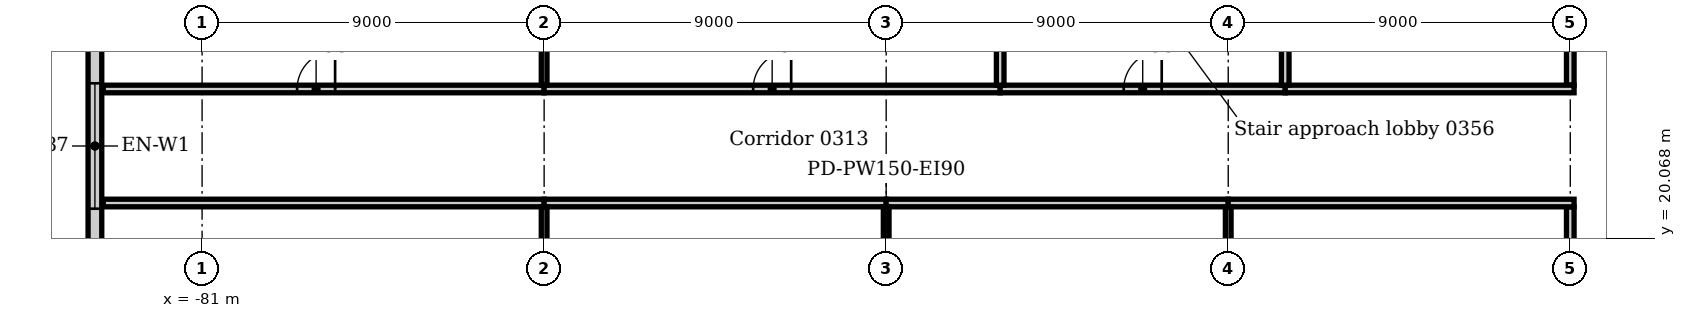
"""IFC4 building model, lengths in metres.
Left out: names, types, materials, properties, quantities, classifications, styles, units other than length and angle.
Written with IfcOpenShell. Run it as: python <this file> out.ifc"""

import sys

from ifc_helpers import new_model, si_unit, direction, frame, frame_2d, origin, place, context, subcontext, project, spatial, rectangle, extrude, element, fill, save


model = new_model("IFC4")
c1 = context("Model", 3, precision=1e-05, world=origin(), true_north=direction((0.0, 1.0)))
c2 = subcontext(c1, "Body", "Model", "MODEL_VIEW")
j1 = project(units=[si_unit("LENGTHUNIT", "METRE"), si_unit("PLANEANGLEUNIT", "RADIAN")], contexts=[c1])
p1 = place(None, origin())
s1 = spatial("IfcSite", under=j1, at=p1, CompositionType="ELEMENT")
p2 = place(p1, origin())
s2 = spatial("IfcBuilding", under=s1, at=p2, CompositionType="ELEMENT")
p3 = place(p2, frame((0.0, 0.0, 16.0)))
s3 = spatial("IfcBuildingStorey", under=s2, at=p3, CompositionType="ELEMENT", Elevation=16.0)
p4 = place(p3, frame((-83.82, 54.0, 0.0), z_axis=(0.0, 0.0, 1.0), x_axis=(0.0, -1.0, 0.0)))
e1 = element("IfcWall", 1, at=p4, inside=s3, PredefinedType="STANDARD", context=c2, shape_type="SweptSolid", body=[
    extrude(rectangle(XDim=63.0, YDim=0.36, at=frame_2d((31.5, 0.0))), origin(), (0.0, 0.0, 1.0), 4.7),
])
p5 = place(p4, frame((2.85, 0.0, 0.9)))
e2 = element("IfcOpeningElement", 2, at=p5, cuts=e1, PredefinedType="OPENING", context=c2, shape_type="SweptSolid", body=[
    extrude(rectangle(XDim=3.3, YDim=2.4, at=frame_2d((1.65, 1.2))), frame((0.0, 0.19, 0.0), z_axis=(0.0, -1.0, 0.0), x_axis=(1.0, 0.0, 0.0)), (0.0, 0.0, 1.0), 0.38),
])
p6 = place(p4, frame((7.35, 0.0, 0.9)))
e3 = element("IfcOpeningElement", 3, at=p6, cuts=e1, PredefinedType="OPENING", context=c2, shape_type="SweptSolid", body=[
    extrude(rectangle(XDim=3.3, YDim=2.4, at=frame_2d((1.65, 1.2))), frame((0.0, 0.19, 0.0), z_axis=(0.0, -1.0, 0.0), x_axis=(1.0, 0.0, 0.0)), (0.0, 0.0, 1.0), 0.38),
])
p7 = place(p4, frame((11.85, 0.0, 0.9)))
e4 = element("IfcOpeningElement", 4, at=p7, cuts=e1, PredefinedType="OPENING", context=c2, shape_type="SweptSolid", body=[
    extrude(rectangle(XDim=3.3, YDim=2.4, at=frame_2d((1.65, 1.2))), frame((0.0, 0.19, 0.0), z_axis=(0.0, -1.0, 0.0), x_axis=(1.0, 0.0, 0.0)), (0.0, 0.0, 1.0), 0.38),
])
p8 = place(p4, frame((16.35, 0.0, 0.9)))
e5 = element("IfcOpeningElement", 5, at=p8, cuts=e1, PredefinedType="OPENING", context=c2, shape_type="SweptSolid", body=[
    extrude(rectangle(XDim=3.3, YDim=2.4, at=frame_2d((1.65, 1.2))), frame((0.0, 0.19, 0.0), z_axis=(0.0, -1.0, 0.0), x_axis=(1.0, 0.0, 0.0)), (0.0, 0.0, 1.0), 0.38),
])
p9 = place(p4, frame((20.85, 0.0, 0.9)))
e6 = element("IfcOpeningElement", 6, at=p9, cuts=e1, PredefinedType="OPENING", context=c2, shape_type="SweptSolid", body=[
    extrude(rectangle(XDim=3.3, YDim=2.4, at=frame_2d((1.65, 1.2))), frame((0.0, 0.19, 0.0), z_axis=(0.0, -1.0, 0.0), x_axis=(1.0, 0.0, 0.0)), (0.0, 0.0, 1.0), 0.38),
])
p10 = place(p4, frame((25.35, 0.0, 0.9)))
e7 = element("IfcOpeningElement", 7, at=p10, cuts=e1, PredefinedType="OPENING", context=c2, shape_type="SweptSolid", body=[
    extrude(rectangle(XDim=3.3, YDim=2.4, at=frame_2d((1.65, 1.2))), frame((0.0, 0.19, 0.0), z_axis=(0.0, -1.0, 0.0), x_axis=(1.0, 0.0, 0.0)), (0.0, 0.0, 1.0), 0.38),
])
p11 = place(p4, frame((29.85, 0.0, 0.9)))
e8 = element("IfcOpeningElement", 8, at=p11, cuts=e1, PredefinedType="OPENING", context=c2, shape_type="SweptSolid", body=[
    extrude(rectangle(XDim=3.3, YDim=2.4, at=frame_2d((1.65, 1.2))), frame((0.0, 0.19, 0.0), z_axis=(0.0, -1.0, 0.0), x_axis=(1.0, 0.0, 0.0)), (0.0, 0.0, 1.0), 0.38),
])
p12 = place(p4, frame((34.35, 0.0, 0.9)))
e9 = element("IfcOpeningElement", 9, at=p12, cuts=e1, PredefinedType="OPENING", context=c2, shape_type="SweptSolid", body=[
    extrude(rectangle(XDim=3.3, YDim=2.4, at=frame_2d((1.65, 1.2))), frame((0.0, 0.19, 0.0), z_axis=(0.0, -1.0, 0.0), x_axis=(1.0, 0.0, 0.0)), (0.0, 0.0, 1.0), 0.38),
])
p13 = place(p4, frame((38.85, 0.0, 0.9)))
e10 = element("IfcOpeningElement", 10, at=p13, cuts=e1, PredefinedType="OPENING", context=c2, shape_type="SweptSolid", body=[
    extrude(rectangle(XDim=3.3, YDim=2.4, at=frame_2d((1.65, 1.2))), frame((0.0, 0.19, 0.0), z_axis=(0.0, -1.0, 0.0), x_axis=(1.0, 0.0, 0.0)), (0.0, 0.0, 1.0), 0.38),
])
p14 = place(p4, frame((43.35, 0.0, 0.9)))
e11 = element("IfcOpeningElement", 11, at=p14, cuts=e1, PredefinedType="OPENING", context=c2, shape_type="SweptSolid", body=[
    extrude(rectangle(XDim=3.3, YDim=2.4, at=frame_2d((1.65, 1.2))), frame((0.0, 0.19, 0.0), z_axis=(0.0, -1.0, 0.0), x_axis=(1.0, 0.0, 0.0)), (0.0, 0.0, 1.0), 0.38),
])
p15 = place(p4, frame((47.85, 0.0, 0.9)))
e12 = element("IfcOpeningElement", 12, at=p15, cuts=e1, PredefinedType="OPENING", context=c2, shape_type="SweptSolid", body=[
    extrude(rectangle(XDim=3.3, YDim=2.4, at=frame_2d((1.65, 1.2))), frame((0.0, 0.19, 0.0), z_axis=(0.0, -1.0, 0.0), x_axis=(1.0, 0.0, 0.0)), (0.0, 0.0, 1.0), 0.38),
])
p16 = place(p4, frame((52.35, 0.0, 0.9)))
e13 = element("IfcOpeningElement", 13, at=p16, cuts=e1, PredefinedType="OPENING", context=c2, shape_type="SweptSolid", body=[
    extrude(rectangle(XDim=3.3, YDim=2.4, at=frame_2d((1.65, 1.2))), frame((0.0, 0.19, 0.0), z_axis=(0.0, -1.0, 0.0), x_axis=(1.0, 0.0, 0.0)), (0.0, 0.0, 1.0), 0.38),
])
p17 = place(p4, frame((56.85, 0.0, 0.9)))
e14 = element("IfcOpeningElement", 14, at=p17, cuts=e1, PredefinedType="OPENING", context=c2, shape_type="SweptSolid", body=[
    extrude(rectangle(XDim=3.3, YDim=2.4, at=frame_2d((1.65, 1.2))), frame((0.0, 0.19, 0.0), z_axis=(0.0, -1.0, 0.0), x_axis=(1.0, 0.0, 0.0)), (0.0, 0.0, 1.0), 0.38),
])
for number, where, z_axis, x_axis in (
    (15, (-45.0, 18.42, 0.0), (0.0, 0.0, 1.0), (0.0, 1.0, 0.0)),
    (16, (-45.0, 24.1, 0.0), (0.0, 0.0, 1.0), (0.0, 1.0, 0.0)),
):
    element("IfcWall", number, at=place(p3, frame(where, z_axis=z_axis, x_axis=x_axis)), inside=s3, PredefinedType="PARTITIONING", context=c2, shape_type="SweptSolid", body=[
        extrude(rectangle(XDim=2.48, YDim=0.2, at=frame_2d((1.24, 0.0))), origin(), (0.0, 0.0, 1.0), 4.7),
    ])
p18 = place(p3, frame((-83.6, 21.0, 0.0), z_axis=(0.0, 0.0, 1.0), x_axis=(1.0, 0.0, 0.0)))
e17 = element("IfcWall", 17, at=p18, inside=s3, PredefinedType="PARTITIONING", context=c2, shape_type="SweptSolid", body=[
    extrude(rectangle(XDim=11.6, YDim=0.2, at=frame_2d((5.8, 0.0))), origin(), (0.0, 0.0, 1.0), 4.7),
])
for number, where, z_axis, x_axis in (
    (18, (-72.0, 21.0, 0.0), (0.0, 0.0, 1.0), (1.0, 0.0, 0.0)),
    (19, (-63.0, 21.0, 0.0), (0.0, 0.0, 1.0), (1.0, 0.0, 0.0)),
):
    element("IfcWall", number, at=place(p3, frame(where, z_axis=z_axis, x_axis=x_axis)), inside=s3, PredefinedType="PARTITIONING", context=c2, shape_type="SweptSolid", body=[
        extrude(rectangle(XDim=9.0, YDim=0.2, at=frame_2d((4.5, 0.0))), origin(), (0.0, 0.0, 1.0), 4.7),
    ])
p19 = place(p3, frame((-54.0, 21.0, 0.0), z_axis=(0.0, 0.0, 1.0), x_axis=(1.0, 0.0, 0.0)))
e20 = element("IfcWall", 20, at=p19, inside=s3, PredefinedType="PARTITIONING", context=c2, shape_type="SweptSolid", body=[
    extrude(rectangle(XDim=9.1, YDim=0.2, at=frame_2d((4.55, 0.0))), origin(), (0.0, 0.0, 1.0), 4.7),
])
p20 = place(p3, frame((-83.6, 24.0, 0.0), z_axis=(0.0, 0.0, 1.0), x_axis=(1.0, 0.0, 0.0)))
e21 = element("IfcWall", 21, at=p20, inside=s3, PredefinedType="PARTITIONING", context=c2, shape_type="SweptSolid", body=[
    extrude(rectangle(XDim=11.6, YDim=0.2, at=frame_2d((5.8, 0.0))), origin(), (0.0, 0.0, 1.0), 4.7),
])
p21 = place(p20, frame((5.1, 0.0, 0.0)))
e22 = element("IfcOpeningElement", 22, at=p21, cuts=e21, PredefinedType="OPENING", context=c2, shape_type="SweptSolid", body=[
    extrude(rectangle(XDim=1.0, YDim=2.1, at=frame_2d((0.5, 1.05))), frame((0.0, 0.11, 0.0), z_axis=(0.0, -1.0, 0.0), x_axis=(1.0, 0.0, 0.0)), (0.0, 0.0, 1.0), 0.22),
])
p22 = place(p3, frame((-72.0, 24.0, 0.0), z_axis=(0.0, 0.0, 1.0), x_axis=(1.0, 0.0, 0.0)))
e23 = element("IfcWall", 23, at=p22, inside=s3, PredefinedType="PARTITIONING", context=c2, shape_type="SweptSolid", body=[
    extrude(rectangle(XDim=12.0, YDim=0.2, at=frame_2d((6.0, 0.0))), origin(), (0.0, 0.0, 1.0), 4.7),
])
p23 = place(p22, frame((5.5, 0.0, 0.0)))
e24 = element("IfcOpeningElement", 24, at=p23, cuts=e23, PredefinedType="OPENING", context=c2, shape_type="SweptSolid", body=[
    extrude(rectangle(XDim=1.0, YDim=2.1, at=frame_2d((0.5, 1.05))), frame((0.0, 0.11, 0.0), z_axis=(0.0, -1.0, 0.0), x_axis=(1.0, 0.0, 0.0)), (0.0, 0.0, 1.0), 0.22),
])
p24 = place(p3, frame((-60.0, 24.0, 0.0), z_axis=(0.0, 0.0, 1.0), x_axis=(1.0, 0.0, 0.0)))
e25 = element("IfcWall", 25, at=p24, inside=s3, PredefinedType="PARTITIONING", context=c2, shape_type="SweptSolid", body=[
    extrude(rectangle(XDim=7.5, YDim=0.2, at=frame_2d((3.75, 0.0))), origin(), (0.0, 0.0, 1.0), 4.7),
])
p25 = place(p24, frame((3.25, 0.0, 0.0)))
e26 = element("IfcOpeningElement", 26, at=p25, cuts=e25, PredefinedType="OPENING", context=c2, shape_type="SweptSolid", body=[
    extrude(rectangle(XDim=1.0, YDim=2.1, at=frame_2d((0.5, 1.05))), frame((0.0, 0.11, 0.0), z_axis=(0.0, -1.0, 0.0), x_axis=(1.0, 0.0, 0.0)), (0.0, 0.0, 1.0), 0.22),
])
p26 = place(p3, frame((-52.5, 24.0, 0.0), z_axis=(0.0, 0.0, 1.0), x_axis=(1.0, 0.0, 0.0)))
e27 = element("IfcWall", 27, at=p26, inside=s3, PredefinedType="PARTITIONING", context=c2, shape_type="SweptSolid", body=[
    extrude(rectangle(XDim=7.6, YDim=0.2, at=frame_2d((3.8, 0.0))), origin(), (0.0, 0.0, 1.0), 4.7),
])
p27 = place(p3, frame((-72.0, 3.7, 0.0), z_axis=(0.0, 0.0, 1.0), x_axis=(0.0, 1.0, 0.0)))
e28 = element("IfcWall", 28, at=p27, inside=s3, PredefinedType="PARTITIONING", context=c2, shape_type="SweptSolid", body=[
    extrude(rectangle(XDim=17.2, YDim=0.15, at=frame_2d((8.6, 0.0))), origin(), (0.0, 0.0, 1.0), 4.7),
])
for number, where, z_axis, x_axis in (
    (29, (-63.0, 18.42, 0.0), (0.0, 0.0, 1.0), (0.0, 1.0, 0.0)),
    (30, (-54.0, 18.42, 0.0), (0.0, 0.0, 1.0), (0.0, 1.0, 0.0)),
):
    element("IfcWall", number, at=place(p3, frame(where, z_axis=z_axis, x_axis=x_axis)), inside=s3, PredefinedType="PARTITIONING", context=c2, shape_type="SweptSolid", body=[
        extrude(rectangle(XDim=2.48, YDim=0.15, at=frame_2d((1.24, 0.0))), origin(), (0.0, 0.0, 1.0), 4.7),
    ])
p28 = place(p3, frame((-72.0, 24.1, 0.0), z_axis=(0.0, 0.0, 1.0), x_axis=(0.0, 1.0, 0.0)))
e31 = element("IfcWall", 31, at=p28, inside=s3, PredefinedType="PARTITIONING", context=c2, shape_type="SweptSolid", body=[
    extrude(rectangle(XDim=17.45, YDim=0.15, at=frame_2d((8.725, 0.0))), origin(), (0.0, 0.0, 1.0), 4.7),
])
for number, where, z_axis, x_axis in (
    (32, (-60.0, 24.1, 0.0), (0.0, 0.0, 1.0), (0.0, 1.0, 0.0)),
    (33, (-52.5, 24.1, 0.0), (0.0, 0.0, 1.0), (0.0, 1.0, 0.0)),
):
    element("IfcWall", number, at=place(p3, frame(where, z_axis=z_axis, x_axis=x_axis)), inside=s3, PredefinedType="PARTITIONING", context=c2, shape_type="SweptSolid", body=[
        extrude(rectangle(XDim=5.15, YDim=0.2, at=frame_2d((2.575, 0.0))), origin(), (0.0, 0.0, 1.0), 4.7),
    ])
p29 = place(p11, origin())
e34 = element("IfcWindow", 34, at=p29, inside=s3, PartitioningType="SINGLE_PANEL", PredefinedType="WINDOW", context=c2, shape_type="SweptSolid", body=[
    extrude(rectangle(XDim=3.3, YDim=2.4, at=frame_2d((1.65, 1.2))), frame((0.0, 0.13, 0.0), z_axis=(0.0, -1.0, 0.0), x_axis=(1.0, 0.0, 0.0)), (0.0, 0.0, 1.0), 0.06),
])
fill(e8, e34)
p30 = place(p21, origin())
e35 = element("IfcDoor", 35, at=p30, inside=s3, OperationType="SINGLE_SWING_RIGHT", PredefinedType="DOOR", context=c2, shape_type="SweptSolid", body=[
    extrude(rectangle(XDim=1.0, YDim=2.1, at=frame_2d((0.5, 1.05))), frame((0.0, 0.025, 0.0), z_axis=(0.0, -1.0, 0.0), x_axis=(1.0, 0.0, 0.0)), (0.0, 0.0, 1.0), 0.05),
])
fill(e22, e35)
p31 = place(p23, origin())
e36 = element("IfcDoor", 36, at=p31, inside=s3, OperationType="SINGLE_SWING_RIGHT", PredefinedType="DOOR", context=c2, shape_type="SweptSolid", body=[
    extrude(rectangle(XDim=1.0, YDim=2.1, at=frame_2d((0.5, 1.05))), frame((0.0, 0.025, 0.0), z_axis=(0.0, -1.0, 0.0), x_axis=(1.0, 0.0, 0.0)), (0.0, 0.0, 1.0), 0.05),
])
fill(e24, e36)
p32 = place(p25, origin())
e37 = element("IfcDoor", 37, at=p32, inside=s3, OperationType="SINGLE_SWING_RIGHT", PredefinedType="DOOR", context=c2, shape_type="SweptSolid", body=[
    extrude(rectangle(XDim=1.0, YDim=2.1, at=frame_2d((0.5, 1.05))), frame((0.0, 0.025, 0.0), z_axis=(0.0, -1.0, 0.0), x_axis=(1.0, 0.0, 0.0)), (0.0, 0.0, 1.0), 0.05),
])
fill(e26, e37)
save(model, sys.argv[1])
